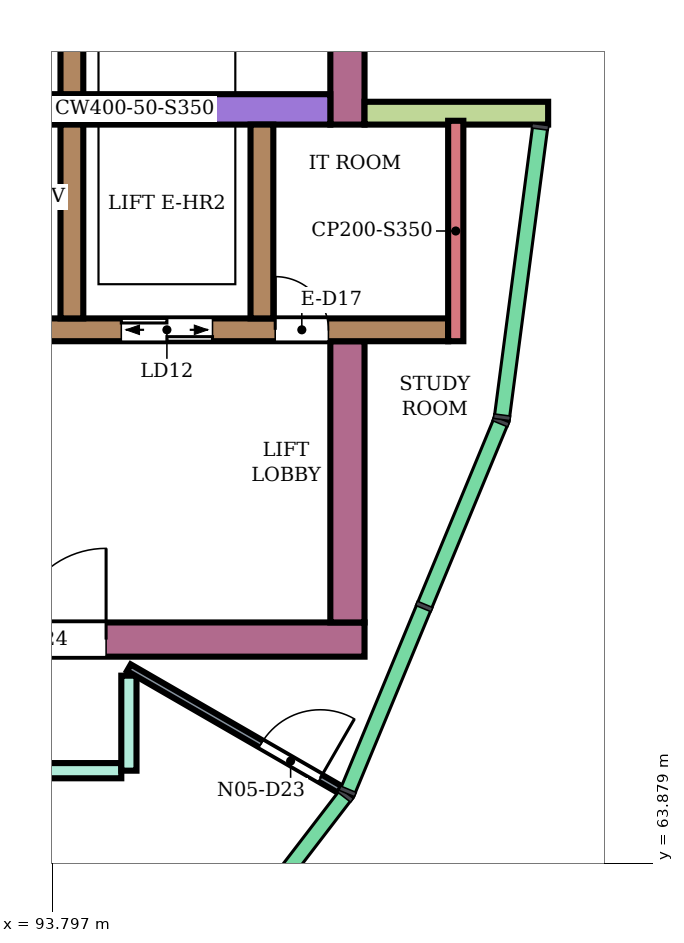
"""IFC4 building model, lengths in metres.
Left out: names, types, materials, properties, quantities, classifications, styles, units other than length and angle.
Written with IfcOpenShell. Run it as: python <this file> out.ifc"""

import sys

from ifc_helpers import new_model, si_unit, direction, frame, frame_2d, origin, place, context, subcontext, project, spatial, rectangle, extrude, element, fill, save


model = new_model("IFC4")
c1 = context("Model", 3, precision=1e-05, world=origin(), true_north=direction((0.0, 1.0)))
c2 = subcontext(c1, "Body", "Model", "MODEL_VIEW")
j1 = project(units=[si_unit("LENGTHUNIT", "METRE"), si_unit("PLANEANGLEUNIT", "RADIAN")], contexts=[c1])
p1 = place(None, origin())
s1 = spatial("IfcSite", under=j1, at=p1, CompositionType="ELEMENT")
p2 = place(p1, origin())
s2 = spatial("IfcBuilding", under=s1, at=p2, CompositionType="ELEMENT")
p3 = place(p2, frame((0.0, 0.0, 323.7)))
s3 = spatial("IfcBuildingStorey", under=s2, at=p3, CompositionType="ELEMENT", Elevation=323.7)
p4 = place(p3, frame((87.9, 66.825, 0.0), z_axis=(0.0, 0.0, 1.0), x_axis=(1.0, 0.0, 0.0)))
e1 = element("IfcWall", 1, at=p4, inside=s3, PredefinedType="SHEAR", context=c2, shape_type="SweptSolid", body=[
    extrude(rectangle(XDim=10.0, YDim=0.45, at=frame_2d((5.0, 0.0))), origin(), (0.0, 0.0, 1.0), 4.05),
])
p5 = place(p4, frame((4.2, 0.0, 0.0)))
e2 = element("IfcOpeningElement", 2, at=p5, cuts=e1, PredefinedType="OPENING", context=c2, shape_type="SweptSolid", body=[
    extrude(rectangle(XDim=2.4, YDim=2.4, at=frame_2d((1.2, 1.2))), frame((0.0, 0.235, 0.0), z_axis=(0.0, -1.0, 0.0), x_axis=(1.0, 0.0, 0.0)), (0.0, 0.0, 1.0), 0.47),
])
p6 = place(p3, frame((97.675, 73.6, 0.0), z_axis=(0.0, 0.0, 1.0), x_axis=(0.0, 1.0, 0.0)))
e3 = element("IfcWall", 3, at=p6, inside=s3, PredefinedType="SHEAR", context=c2, shape_type="SweptSolid", body=[
    extrude(rectangle(XDim=9.35, YDim=0.45, at=frame_2d((4.675, 0.0))), origin(), (0.0, 0.0, 1.0), 4.05),
])
p7 = place(p3, frame((97.675, 67.05, 0.0), z_axis=(0.0, 0.0, 1.0), x_axis=(0.0, 1.0, 0.0)))
e4 = element("IfcWall", 4, at=p7, inside=s3, PredefinedType="SHEAR", context=c2, shape_type="SweptSolid", body=[
    extrude(rectangle(XDim=3.7, YDim=0.45, at=frame_2d((1.85, 0.0))), origin(), (0.0, 0.0, 1.0), 4.05),
])
p8 = place(p3, frame((91.7, 73.8, 0.0), z_axis=(0.0, 0.0, 1.0), x_axis=(1.0, 0.0, 0.0)))
e5 = element("IfcWall", 5, at=p8, inside=s3, PredefinedType="SHEAR", context=c2, shape_type="SweptSolid", body=[
    extrude(rectangle(XDim=5.75, YDim=0.4, at=frame_2d((2.875, 0.0))), origin(), (0.0, 0.0, 1.0), 4.05),
])
p9 = place(p3, frame((91.7, 70.9, 0.0), z_axis=(0.0, 0.0, 1.0), x_axis=(1.0, 0.0, 0.0)))
e6 = element("IfcWall", 6, at=p9, inside=s3, PredefinedType="SHEAR", context=c2, shape_type="SweptSolid", body=[
    extrude(rectangle(XDim=7.3, YDim=0.3, at=frame_2d((3.65, 0.0))), origin(), (0.0, 0.0, 1.0), 4.05),
])
p10 = place(p9, frame((0.4, 0.0, 0.0)))
e7 = element("IfcOpeningElement", 7, at=p10, cuts=e6, PredefinedType="OPENING", context=c2, shape_type="SweptSolid", body=[
    extrude(rectangle(XDim=1.4, YDim=2.1, at=frame_2d((0.7, 1.05))), frame((0.0, 0.16, 0.0), z_axis=(0.0, -1.0, 0.0), x_axis=(1.0, 0.0, 0.0)), (0.0, 0.0, 1.0), 0.32),
])
p11 = place(p9, frame((3.0, 0.0, 0.0)))
e8 = element("IfcOpeningElement", 8, at=p11, cuts=e6, PredefinedType="OPENING", context=c2, shape_type="SweptSolid", body=[
    extrude(rectangle(XDim=1.2, YDim=2.1, at=frame_2d((0.6, 1.05))), frame((0.0, 0.16, 0.0), z_axis=(0.0, -1.0, 0.0), x_axis=(1.0, 0.0, 0.0)), (0.0, 0.0, 1.0), 0.32),
])
p12 = place(p9, frame((5.025, 0.0, 0.0)))
e9 = element("IfcOpeningElement", 9, at=p12, cuts=e6, PredefinedType="OPENING", context=c2, shape_type="SweptSolid", body=[
    extrude(rectangle(XDim=0.7, YDim=2.1, at=frame_2d((0.35, 1.05))), frame((0.0, 0.16, 0.0), z_axis=(0.0, -1.0, 0.0), x_axis=(1.0, 0.0, 0.0)), (0.0, 0.0, 1.0), 0.32),
])
for number, where, z_axis, x_axis in (
    (10, (94.05, 74.0, 0.0), (0.0, 0.0, 1.0), (0.0, 1.0, 0.0)),
    (11, (94.05, 71.05, 0.0), (0.0, 0.0, 1.0), (0.0, 1.0, 0.0)),
    (12, (96.55, 71.05, 0.0), (0.0, 0.0, 1.0), (0.0, 1.0, 0.0)),
):
    element("IfcWall", number, at=place(p3, frame(where, z_axis=z_axis, x_axis=x_axis)), inside=s3, PredefinedType="SHEAR", context=c2, shape_type="SweptSolid", body=[
        extrude(rectangle(XDim=2.55, YDim=0.3, at=frame_2d((1.275, 0.0))), origin(), (0.0, 0.0, 1.0), 4.05),
    ])
p13 = place(p3, frame((97.9, 73.75, 0.0), z_axis=(0.0, 0.0, 1.0), x_axis=(1.0, 0.0, 0.0)))
e13 = element("IfcWall", 13, at=p13, inside=s3, PredefinedType="NOTDEFINED", context=c2, shape_type="SweptSolid", body=[
    extrude(rectangle(XDim=2.416, YDim=0.3, at=frame_2d((1.208, 0.0))), origin(), (0.0, 0.0, 1.0), 4.4),
])
p14 = place(p3, frame((91.8, 65.1, 0.0), z_axis=(0.0, 0.0, 1.0), x_axis=(1.0, 0.0, 0.0)))
e14 = element("IfcWall", 14, at=p14, inside=s3, PredefinedType="PARTITIONING", context=c2, shape_type="SweptSolid", body=[
    extrude(rectangle(XDim=2.9, YDim=0.2, at=frame_2d((1.45, 0.0))), origin(), (0.0, 0.0, 1.0), 3.95),
])
p15 = place(p3, frame((94.8, 65.1, 0.0), z_axis=(0.0, 0.0, 1.0), x_axis=(0.0, 1.0, 0.0)))
e15 = element("IfcWall", 15, at=p15, inside=s3, PredefinedType="PARTITIONING", context=c2, shape_type="SweptSolid", body=[
    extrude(rectangle(XDim=1.25, YDim=0.2, at=frame_2d((0.625, 0.0))), origin(), (0.0, 0.0, 1.0), 3.95),
])
p16 = place(p3, frame((94.8, 66.455, 0.0), z_axis=(0.0, 0.0, 1.0), x_axis=(0.866056279496, -0.499946517884, 0.0)))
e16 = element("IfcWall", 16, at=p16, inside=s3, PredefinedType="PARTITIONING", context=c2, shape_type="SweptSolid", body=[
    extrude(rectangle(XDim=3.207, YDim=0.1, at=frame_2d((1.604, 0.0))), origin(), (0.0, 0.0, 1.0), 3.95),
])
p17 = place(p16, frame((2.007, 0.0, 0.0)))
e17 = element("IfcOpeningElement", 17, at=p17, cuts=e16, PredefinedType="OPENING", context=c2, shape_type="SweptSolid", body=[
    extrude(rectangle(XDim=0.9, YDim=2.1, at=frame_2d((0.45, 1.05))), frame((0.0, 0.06, 0.0), z_axis=(0.0, -1.0, 0.0), x_axis=(1.0, 0.0, 0.0)), (0.0, 0.0, 1.0), 0.12),
])
p18 = place(p3, frame((99.1, 70.75, 0.0), z_axis=(0.0, 0.0, 1.0), x_axis=(0.0, 1.0, 0.0)))
e18 = element("IfcWall", 18, at=p18, inside=s3, PredefinedType="PARTITIONING", context=c2, shape_type="SweptSolid", body=[
    extrude(rectangle(XDim=2.9, YDim=0.2, at=frame_2d((1.45, 0.0))), origin(), (0.0, 0.0, 1.0), 4.05),
])
p19 = place(p17, origin())
e19 = element("IfcDoor", 19, at=p19, inside=s3, OperationType="SINGLE_SWING_RIGHT", PredefinedType="DOOR", context=c2, shape_type="SweptSolid", body=[
    extrude(rectangle(XDim=0.9, YDim=2.1, at=frame_2d((0.45, 1.05))), frame((0.0, 0.025, 0.0), z_axis=(0.0, -1.0, 0.0), x_axis=(1.0, 0.0, 0.0)), (0.0, 0.0, 1.0), 0.05),
])
fill(e17, e19)
p20 = place(p11, origin())
e20 = element("IfcDoor", 20, at=p20, inside=s3, OperationType="DOUBLE_DOOR_SLIDING", PredefinedType="DOOR", context=c2, shape_type="SweptSolid", body=[
    extrude(rectangle(XDim=1.2, YDim=2.1, at=frame_2d((0.6, 1.05))), frame((0.0, 0.025, 0.0), z_axis=(0.0, -1.0, 0.0), x_axis=(1.0, 0.0, 0.0)), (0.0, 0.0, 1.0), 0.05),
])
fill(e8, e20)
p21 = place(p12, origin())
e21 = element("IfcDoor", 21, at=p21, inside=s3, OperationType="SINGLE_SWING_LEFT", PredefinedType="DOOR", context=c2, shape_type="SweptSolid", body=[
    extrude(rectangle(XDim=0.7, YDim=2.1, at=frame_2d((0.35, 1.05))), frame((0.0, 0.025, 0.0), z_axis=(0.0, -1.0, 0.0), x_axis=(1.0, 0.0, 0.0)), (0.0, 0.0, 1.0), 0.05),
])
fill(e9, e21)
p22 = place(p5, origin())
e22 = element("IfcDoor", 22, at=p22, inside=s3, OperationType="DOUBLE_DOOR_SINGLE_SWING", PredefinedType="DOOR", context=c2, shape_type="SweptSolid", body=[
    extrude(rectangle(XDim=2.4, YDim=2.4, at=frame_2d((1.2, 1.2))), frame((0.0, 0.025, 0.0), z_axis=(0.0, -1.0, 0.0), x_axis=(1.0, 0.0, 0.0)), (0.0, 0.0, 1.0), 0.05),
])
fill(e2, e22)
save(model, sys.argv[1])
